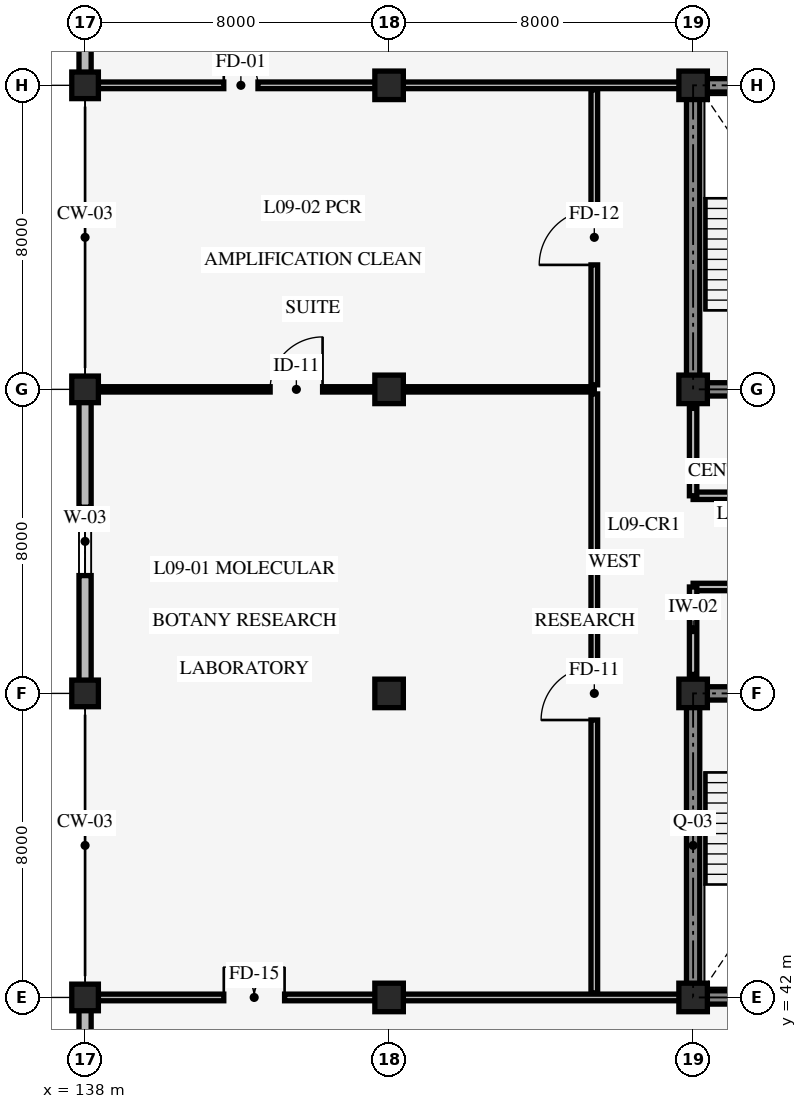
"""IFC4 building model, lengths in metres.
Left out: names, types, materials, properties, quantities, classifications, styles, units other than length and angle.
Written with IfcOpenShell. Run it as: python <this file> out.ifc"""

import sys

from ifc_helpers import new_model, si_unit, direction, frame, frame_2d, origin, origin_2d, place, context, subcontext, project, spatial, rectangle, extrude, element, fill, save


model = new_model("IFC4")
c1 = context("Model", 3, precision=1e-05, world=origin(), true_north=direction((0.0, 1.0)))
c2 = subcontext(c1, "Body", "Model", "MODEL_VIEW")
j1 = project(units=[si_unit("LENGTHUNIT", "METRE"), si_unit("PLANEANGLEUNIT", "RADIAN")], contexts=[c1])
p1 = place(None, origin())
s1 = spatial("IfcSite", under=j1, at=p1, CompositionType="ELEMENT")
p2 = place(p1, origin())
s2 = spatial("IfcBuilding", under=s1, at=p2, CompositionType="ELEMENT")
p3 = place(p2, frame((0.0, 0.0, 36.0)))
s3 = spatial("IfcBuildingStorey", under=s2, at=p3, CompositionType="ELEMENT", Elevation=36.0)
p4 = place(p3, frame((154.0, 42.0, 0.0), z_axis=(0.0, 0.0, 1.0), x_axis=(1.0, 0.0, 0.0)))
e1 = element("IfcWall", 1, at=p4, inside=s3, PredefinedType="SHEAR", context=c2, shape_type="SweptSolid", body=[
    extrude(rectangle(XDim=8.0, YDim=0.35, at=frame_2d((4.0, 0.0))), origin(), (0.0, 0.0, 1.0), 3.95),
])
p5 = place(p3, frame((162.0, 50.0, 0.0), z_axis=(0.0, 0.0, 1.0), x_axis=(-1.0, 0.0, 0.0)))
e2 = element("IfcWall", 2, at=p5, inside=s3, PredefinedType="SHEAR", context=c2, shape_type="SweptSolid", body=[
    extrude(rectangle(XDim=8.0, YDim=0.35, at=frame_2d((4.0, 0.0))), origin(), (0.0, 0.0, 1.0), 3.95),
])
p6 = place(p5, frame((5.3, 0.0, 0.0)))
e3 = element("IfcOpeningElement", 3, at=p6, cuts=e2, PredefinedType="OPENING", context=c2, shape_type="SweptSolid", body=[
    extrude(rectangle(XDim=1.3, YDim=2.15, at=frame_2d((0.65, 1.075))), frame((0.0, 0.185, 0.0), z_axis=(0.0, -1.0, 0.0), x_axis=(1.0, 0.0, 0.0)), (0.0, 0.0, 1.0), 0.37),
])
p7 = place(p5, frame((1.45, 0.0, 0.0)))
e4 = element("IfcOpeningElement", 4, at=p7, cuts=e2, PredefinedType="OPENING", context=c2, shape_type="SweptSolid", body=[
    extrude(rectangle(XDim=1.1, YDim=2.2, at=frame_2d((0.55, 1.1))), frame((0.0, 0.185, 0.0), z_axis=(0.0, -1.0, 0.0), x_axis=(1.0, 0.0, 0.0)), (0.0, 0.0, 1.0), 0.37),
])
p8 = place(p3, frame((154.0, 50.0, 0.0), z_axis=(0.0, 0.0, 1.0), x_axis=(0.0, -1.0, 0.0)))
e5 = element("IfcWall", 5, at=p8, inside=s3, PredefinedType="SHEAR", context=c2, shape_type="SweptSolid", body=[
    extrude(rectangle(XDim=8.0, YDim=0.35, at=frame_2d((4.0, 0.0))), origin(), (0.0, 0.0, 1.0), 3.95),
])
p9 = place(p3, frame((154.0, 58.0, 0.0), z_axis=(0.0, 0.0, 1.0), x_axis=(1.0, 0.0, 0.0)))
e6 = element("IfcWall", 6, at=p9, inside=s3, PredefinedType="SHEAR", context=c2, shape_type="SweptSolid", body=[
    extrude(rectangle(XDim=8.0, YDim=0.35, at=frame_2d((4.0, 0.0))), origin(), (0.0, 0.0, 1.0), 3.95),
])
p10 = place(p9, frame((1.4, 0.0, 0.0)))
e7 = element("IfcOpeningElement", 7, at=p10, cuts=e6, PredefinedType="OPENING", context=c2, shape_type="SweptSolid", body=[
    extrude(rectangle(XDim=1.3, YDim=2.15, at=frame_2d((0.65, 1.075))), frame((0.0, 0.185, 0.0), z_axis=(0.0, -1.0, 0.0), x_axis=(1.0, 0.0, 0.0)), (0.0, 0.0, 1.0), 0.37),
])
p11 = place(p9, frame((5.3, 0.0, 0.0)))
e8 = element("IfcOpeningElement", 8, at=p11, cuts=e6, PredefinedType="OPENING", context=c2, shape_type="SweptSolid", body=[
    extrude(rectangle(XDim=1.1, YDim=2.2, at=frame_2d((0.55, 1.1))), frame((0.0, 0.185, 0.0), z_axis=(0.0, -1.0, 0.0), x_axis=(1.0, 0.0, 0.0)), (0.0, 0.0, 1.0), 0.37),
])
for number, where, z_axis, x_axis in (
    (9, (162.0, 66.0, 0.0), (0.0, 0.0, 1.0), (-1.0, 0.0, 0.0)),
    (10, (154.0, 66.0, 0.0), (0.0, 0.0, 1.0), (0.0, -1.0, 0.0)),
):
    element("IfcWall", number, at=place(p3, frame(where, z_axis=z_axis, x_axis=x_axis)), inside=s3, PredefinedType="SHEAR", context=c2, shape_type="SweptSolid", body=[
        extrude(rectangle(XDim=8.0, YDim=0.35, at=frame_2d((4.0, 0.0))), origin(), (0.0, 0.0, 1.0), 3.95),
    ])
for number, where, z_axis, x_axis in (
    (11, (138.0, 42.0, 0.0), (0.0, 0.0, 1.0), (1.0, 0.0, 0.0)),
    (12, (138.0, 50.0, 0.0), (0.0, 0.0, 1.0), (1.0, 0.0, 0.0)),
    (13, (138.0, 58.0, 0.0), (0.0, 0.0, 1.0), (1.0, 0.0, 0.0)),
    (14, (138.0, 66.0, 0.0), (0.0, 0.0, 1.0), (1.0, 0.0, 0.0)),
):
    element("IfcColumn", number, at=place(p3, frame(where, z_axis=z_axis, x_axis=x_axis)), inside=s3, PredefinedType="COLUMN", context=c2, shape_type="SweptSolid", body=[
        extrude(rectangle(XDim=0.7, YDim=0.7, at=origin_2d()), origin(), (0.0, 0.0, 1.0), 4.2),
    ])
for number, where, z_axis, x_axis in (
    (15, (146.0, 42.0, 0.0), (0.0, 0.0, 1.0), (1.0, 0.0, 0.0)),
    (16, (146.0, 50.0, 0.0), (0.0, 0.0, 1.0), (1.0, 0.0, 0.0)),
    (17, (146.0, 58.0, 0.0), (0.0, 0.0, 1.0), (1.0, 0.0, 0.0)),
    (18, (146.0, 66.0, 0.0), (0.0, 0.0, 1.0), (1.0, 0.0, 0.0)),
    (19, (154.0, 42.0, 0.0), (0.0, 0.0, 1.0), (1.0, 0.0, 0.0)),
    (20, (154.0, 50.0, 0.0), (0.0, 0.0, 1.0), (1.0, 0.0, 0.0)),
    (21, (154.0, 58.0, 0.0), (0.0, 0.0, 1.0), (1.0, 0.0, 0.0)),
    (22, (154.0, 66.0, 0.0), (0.0, 0.0, 1.0), (1.0, 0.0, 0.0)),
):
    element("IfcColumn", number, at=place(p3, frame(where, z_axis=z_axis, x_axis=x_axis)), inside=s3, PredefinedType="COLUMN", context=c2, shape_type="SweptSolid", body=[
        extrude(rectangle(XDim=0.75, YDim=0.75, at=origin_2d()), origin(), (0.0, 0.0, 1.0), 4.2),
    ])
p12 = place(p3, frame((138.0, 34.0, 0.0), z_axis=(0.0, 0.0, 1.0), x_axis=(0.0, 1.0, 0.0)))
e23 = element("IfcWall", 23, at=p12, inside=s3, PredefinedType="STANDARD", context=c2, shape_type="SweptSolid", body=[
    extrude(rectangle(XDim=8.0, YDim=0.32, at=frame_2d((4.0, 0.0))), origin(), (0.0, 0.0, 1.0), 3.4),
])
p13 = place(p12, frame((2.95, 0.0, 0.85)))
e24 = element("IfcOpeningElement", 24, at=p13, cuts=e23, PredefinedType="OPENING", context=c2, shape_type="SweptSolid", body=[
    extrude(rectangle(XDim=2.1, YDim=1.6, at=frame_2d((1.05, 0.8))), frame((0.0, 0.17, 0.0), z_axis=(0.0, -1.0, 0.0), x_axis=(1.0, 0.0, 0.0)), (0.0, 0.0, 1.0), 0.34),
])
p14 = place(p3, frame((138.0, 50.0, 0.0), z_axis=(0.0, 0.0, 1.0), x_axis=(0.0, 1.0, 0.0)))
e25 = element("IfcWall", 25, at=p14, inside=s3, PredefinedType="STANDARD", context=c2, shape_type="SweptSolid", body=[
    extrude(rectangle(XDim=8.0, YDim=0.32, at=frame_2d((4.0, 0.0))), origin(), (0.0, 0.0, 1.0), 3.4),
])
p15 = place(p14, frame((3.1, 0.0, 0.85)))
e26 = element("IfcOpeningElement", 26, at=p15, cuts=e25, PredefinedType="OPENING", context=c2, shape_type="SweptSolid", body=[
    extrude(rectangle(XDim=1.8, YDim=1.4, at=frame_2d((0.9, 0.7))), frame((0.0, 0.17, 0.0), z_axis=(0.0, -1.0, 0.0), x_axis=(1.0, 0.0, 0.0)), (0.0, 0.0, 1.0), 0.34),
])
p16 = place(p3, frame((138.0, 66.0, 0.0), z_axis=(0.0, 0.0, 1.0), x_axis=(0.0, 1.0, 0.0)))
e27 = element("IfcWall", 27, at=p16, inside=s3, PredefinedType="STANDARD", context=c2, shape_type="SweptSolid", body=[
    extrude(rectangle(XDim=8.0, YDim=0.32, at=frame_2d((4.0, 0.0))), origin(), (0.0, 0.0, 1.0), 3.4),
])
p17 = place(p16, frame((3.2, 0.0, 0.85)))
e28 = element("IfcOpeningElement", 28, at=p17, cuts=e27, PredefinedType="OPENING", context=c2, shape_type="SweptSolid", body=[
    extrude(rectangle(XDim=1.6, YDim=1.2, at=frame_2d((0.8, 0.6))), frame((0.0, 0.17, 0.0), z_axis=(0.0, -1.0, 0.0), x_axis=(1.0, 0.0, 0.0)), (0.0, 0.0, 1.0), 0.34),
])
p18 = place(p3, frame((154.0, 52.8, 0.0), z_axis=(0.0, 0.0, 1.0), x_axis=(1.0, 0.0, 0.0)))
e29 = element("IfcWall", 29, at=p18, inside=s3, PredefinedType="STANDARD", context=c2, shape_type="SweptSolid", body=[
    extrude(rectangle(XDim=7.6, YDim=0.195, at=frame_2d((3.8, 0.0))), origin(), (0.0, 0.0, 1.0), 3.9),
])
p19 = place(p18, frame((2.8, 0.0, 0.0)))
e30 = element("IfcOpeningElement", 30, at=p19, cuts=e29, PredefinedType="OPENING", context=c2, shape_type="SweptSolid", body=[
    extrude(rectangle(XDim=1.35, YDim=2.15, at=frame_2d((0.675, 1.075))), frame((0.0, 0.107, 0.0), z_axis=(0.0, -1.0, 0.0), x_axis=(1.0, 0.0, 0.0)), (0.0, 0.0, 1.0), 0.215),
])
p20 = place(p3, frame((154.0, 50.5, 0.0), z_axis=(0.0, 0.0, 1.0), x_axis=(0.0, 1.0, 0.0)))
e31 = element("IfcWall", 31, at=p20, inside=s3, PredefinedType="STANDARD", context=c2, shape_type="SweptSolid", body=[
    extrude(rectangle(XDim=2.3, YDim=0.195, at=frame_2d((1.15, 0.0))), origin(), (0.0, 0.0, 1.0), 3.14),
])
p21 = place(p3, frame((154.0, 55.2, 0.0), z_axis=(0.0, 0.0, 1.0), x_axis=(1.0, 0.0, 0.0)))
e32 = element("IfcWall", 32, at=p21, inside=s3, PredefinedType="STANDARD", context=c2, shape_type="SweptSolid", body=[
    extrude(rectangle(XDim=7.6, YDim=0.195, at=frame_2d((3.8, 0.0))), origin(), (0.0, 0.0, 1.0), 3.9),
])
p22 = place(p21, frame((2.8, 0.0, 0.0)))
e33 = element("IfcOpeningElement", 33, at=p22, cuts=e32, PredefinedType="OPENING", context=c2, shape_type="SweptSolid", body=[
    extrude(rectangle(XDim=1.45, YDim=2.2, at=frame_2d((0.725, 1.1))), frame((0.0, 0.107, 0.0), z_axis=(0.0, -1.0, 0.0), x_axis=(1.0, 0.0, 0.0)), (0.0, 0.0, 1.0), 0.215),
])
p23 = place(p3, frame((154.0, 55.2, 0.0), z_axis=(0.0, 0.0, 1.0), x_axis=(0.0, 1.0, 0.0)))
e34 = element("IfcWall", 34, at=p23, inside=s3, PredefinedType="STANDARD", context=c2, shape_type="SweptSolid", body=[
    extrude(rectangle(XDim=2.3, YDim=0.195, at=frame_2d((1.15, 0.0))), origin(), (0.0, 0.0, 1.0), 3.14),
])
p24 = place(p3, frame((151.4, 42.12, 0.0), z_axis=(0.0, 0.0, 1.0), x_axis=(0.0, 1.0, 0.0)))
e35 = element("IfcWall", 35, at=p24, inside=s3, PredefinedType="STANDARD", context=c2, shape_type="SweptSolid", body=[
    extrude(rectangle(XDim=15.76, YDim=0.175, at=frame_2d((7.88, 0.0))), origin(), (0.0, 0.0, 1.0), 3.9),
])
p25 = place(p24, frame((7.18, 0.0, 0.0)))
e36 = element("IfcOpeningElement", 36, at=p25, cuts=e35, PredefinedType="OPENING", context=c2, shape_type="SweptSolid", body=[
    extrude(rectangle(XDim=1.4, YDim=2.2, at=frame_2d((0.7, 1.1))), frame((0.0, 0.098, 0.0), z_axis=(0.0, -1.0, 0.0), x_axis=(1.0, 0.0, 0.0)), (0.0, 0.0, 1.0), 0.195),
])
p26 = place(p3, frame((138.12, 58.0, 0.0), z_axis=(0.0, 0.0, 1.0), x_axis=(1.0, 0.0, 0.0)))
e37 = element("IfcWall", 37, at=p26, inside=s3, PredefinedType="STANDARD", context=c2, shape_type="SweptSolid", body=[
    extrude(rectangle(XDim=13.28, YDim=0.14, at=frame_2d((6.64, 0.0))), origin(), (0.0, 0.0, 1.0), 3.09),
])
p27 = place(p26, frame((4.75, 0.0, 0.0)))
e38 = element("IfcOpeningElement", 38, at=p27, cuts=e37, PredefinedType="OPENING", context=c2, shape_type="SweptSolid", body=[
    extrude(rectangle(XDim=1.38, YDim=2.16, at=frame_2d((0.69, 1.08))), frame((0.0, 0.08, 0.0), z_axis=(0.0, -1.0, 0.0), x_axis=(1.0, 0.0, 0.0)), (0.0, 0.0, 1.0), 0.16),
])
p28 = place(p3, frame((151.4, 58.12, 0.0), z_axis=(0.0, 0.0, 1.0), x_axis=(0.0, 1.0, 0.0)))
e39 = element("IfcWall", 39, at=p28, inside=s3, PredefinedType="STANDARD", context=c2, shape_type="SweptSolid", body=[
    extrude(rectangle(XDim=7.76, YDim=0.175, at=frame_2d((3.88, 0.0))), origin(), (0.0, 0.0, 1.0), 3.9),
])
p29 = place(p28, frame((3.155, 0.0, 0.0)))
e40 = element("IfcOpeningElement", 40, at=p29, cuts=e39, PredefinedType="OPENING", context=c2, shape_type="SweptSolid", body=[
    extrude(rectangle(XDim=1.45, YDim=2.2, at=frame_2d((0.725, 1.1))), frame((0.0, 0.098, 0.0), z_axis=(0.0, -1.0, 0.0), x_axis=(1.0, 0.0, 0.0)), (0.0, 0.0, 1.0), 0.195),
])
p30 = place(p3, frame((138.35, 42.0, 0.0), z_axis=(0.0, 0.0, 1.0), x_axis=(1.0, 0.0, 0.0)))
e41 = element("IfcWall", 41, at=p30, inside=s3, PredefinedType="STANDARD", context=c2, shape_type="SweptSolid", body=[
    extrude(rectangle(XDim=15.3, YDim=0.175, at=frame_2d((7.65, 0.0))), origin(), (0.0, 0.0, 1.0), 3.09),
])
p31 = place(p30, frame((3.3, 0.0, 0.0)))
e42 = element("IfcOpeningElement", 42, at=p31, cuts=e41, PredefinedType="OPENING", context=c2, shape_type="SweptSolid", body=[
    extrude(rectangle(XDim=1.6, YDim=2.25, at=frame_2d((0.8, 1.125))), frame((0.0, 0.098, 0.0), z_axis=(0.0, -1.0, 0.0), x_axis=(1.0, 0.0, 0.0)), (0.0, 0.0, 1.0), 0.195),
])
p32 = place(p3, frame((138.35, 66.0, 0.0), z_axis=(0.0, 0.0, 1.0), x_axis=(1.0, 0.0, 0.0)))
e43 = element("IfcWall", 43, at=p32, inside=s3, PredefinedType="STANDARD", context=c2, shape_type="SweptSolid", body=[
    extrude(rectangle(XDim=15.3, YDim=0.175, at=frame_2d((7.65, 0.0))), origin(), (0.0, 0.0, 1.0), 3.09),
])
p33 = place(p32, frame((3.3, 0.0, 0.0)))
e44 = element("IfcOpeningElement", 44, at=p33, cuts=e43, PredefinedType="OPENING", context=c2, shape_type="SweptSolid", body=[
    extrude(rectangle(XDim=0.9, YDim=2.1, at=frame_2d((0.45, 1.05))), frame((0.0, 0.098, 0.0), z_axis=(0.0, -1.0, 0.0), x_axis=(1.0, 0.0, 0.0)), (0.0, 0.0, 1.0), 0.195),
])
p34 = place(p15, origin())
e45 = element("IfcWindow", 45, at=p34, inside=s3, PartitioningType="SINGLE_PANEL", PredefinedType="WINDOW", context=c2, shape_type="SweptSolid", body=[
    extrude(rectangle(XDim=1.8, YDim=1.4, at=frame_2d((0.9, 0.7))), frame((0.0, 0.03, 0.0), z_axis=(0.0, -1.0, 0.0), x_axis=(1.0, 0.0, 0.0)), (0.0, 0.0, 1.0), 0.06),
])
fill(e26, e45)
p35 = place(p25, origin())
e46 = element("IfcDoor", 46, at=p35, inside=s3, OperationType="SINGLE_SWING_LEFT", PredefinedType="DOOR", context=c2, shape_type="SweptSolid", body=[
    extrude(rectangle(XDim=1.4, YDim=2.2, at=frame_2d((0.7, 1.1))), frame((0.0, 0.025, 0.0), z_axis=(0.0, -1.0, 0.0), x_axis=(1.0, 0.0, 0.0)), (0.0, 0.0, 1.0), 0.05),
])
fill(e36, e46)
p36 = place(p27, origin())
e47 = element("IfcDoor", 47, at=p36, inside=s3, OperationType="SINGLE_SWING_RIGHT", PredefinedType="DOOR", context=c2, shape_type="SweptSolid", body=[
    extrude(rectangle(XDim=1.38, YDim=2.16, at=frame_2d((0.69, 1.08))), frame((0.0, 0.025, 0.0), z_axis=(0.0, -1.0, 0.0), x_axis=(1.0, 0.0, 0.0)), (0.0, 0.0, 1.0), 0.05),
])
fill(e38, e47)
p37 = place(p29, origin())
e48 = element("IfcDoor", 48, at=p37, inside=s3, OperationType="SINGLE_SWING_LEFT", PredefinedType="DOOR", context=c2, shape_type="SweptSolid", body=[
    extrude(rectangle(XDim=1.45, YDim=2.2, at=frame_2d((0.725, 1.1))), frame((0.0, 0.025, 0.0), z_axis=(0.0, -1.0, 0.0), x_axis=(1.0, 0.0, 0.0)), (0.0, 0.0, 1.0), 0.05),
])
fill(e40, e48)
p38 = place(p31, origin())
e49 = element("IfcDoor", 49, at=p38, inside=s3, OperationType="DOUBLE_DOOR_SINGLE_SWING", PredefinedType="DOOR", context=c2, shape_type="SweptSolid", body=[
    extrude(rectangle(XDim=1.6, YDim=2.25, at=frame_2d((0.8, 1.125))), frame((0.0, 0.025, 0.0), z_axis=(0.0, -1.0, 0.0), x_axis=(1.0, 0.0, 0.0)), (0.0, 0.0, 1.0), 0.05),
])
fill(e42, e49)
p39 = place(p33, origin())
e50 = element("IfcDoor", 50, at=p39, inside=s3, OperationType="SINGLE_SWING_LEFT", PredefinedType="DOOR", context=c2, shape_type="SweptSolid", body=[
    extrude(rectangle(XDim=0.9, YDim=2.1, at=frame_2d((0.45, 1.05))), frame((0.0, 0.025, 0.0), z_axis=(0.0, -1.0, 0.0), x_axis=(1.0, 0.0, 0.0)), (0.0, 0.0, 1.0), 0.05),
])
fill(e44, e50)
save(model, sys.argv[1])
